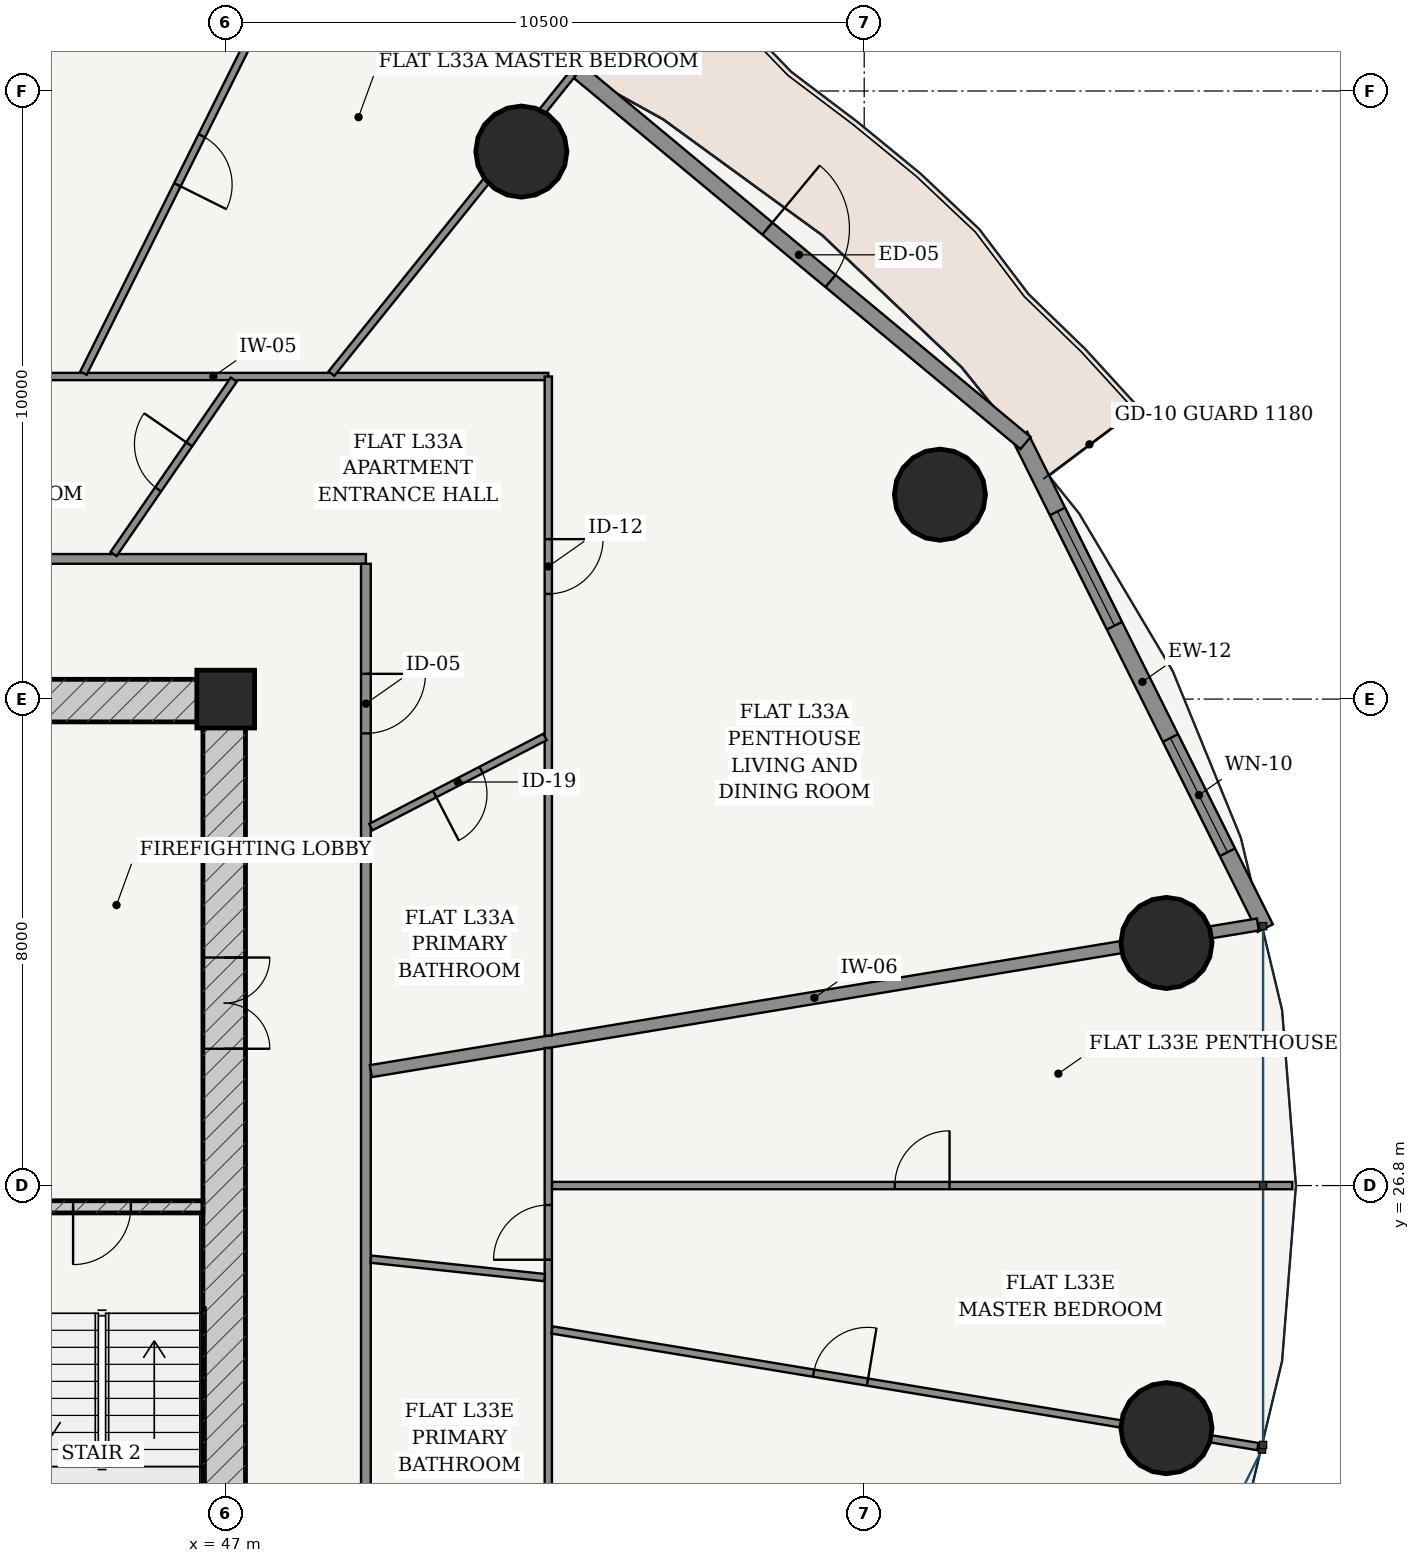
"""IFC4 building model, lengths in metres.
Left out: names, types, materials, properties, quantities, classifications, styles, units other than length and angle.
Written with IfcOpenShell. Run it as: python <this file> out.ifc"""

import sys

from ifc_helpers import new_model, si_unit, direction, frame, frame_2d, origin, origin_2d, place, context, subcontext, project, spatial, rectangle, hollow_circle, extrude, source, transform, mapped, element, fill, save


model = new_model("IFC4")
c1 = context("Model", 3, precision=1e-05, world=origin(), true_north=direction((-0.2419218956, 0.970295726276)))
c2 = subcontext(c1, "Body", "Model", "MODEL_VIEW")
j1 = project(units=[si_unit("LENGTHUNIT", "METRE"), si_unit("PLANEANGLEUNIT", "RADIAN")], contexts=[c1])
p1 = place(None, origin())
s1 = spatial("IfcSite", under=j1, at=p1, CompositionType="ELEMENT")
p2 = place(p1, origin())
s2 = spatial("IfcBuilding", under=s1, at=p2, CompositionType="ELEMENT")
p3 = place(p2, frame((0.0, 0.0, 126.6)))
s3 = spatial("IfcBuildingStorey", under=s2, at=p3, CompositionType="ELEMENT", Elevation=126.6)
p4 = place(p3, frame((47.0, 34.8, 0.0), z_axis=(0.0, 0.0, 1.0), x_axis=(1.0, 0.0, 0.0)))
e1 = element("IfcColumn", 1, at=p4, inside=s3, PredefinedType="COLUMN", context=c2, shape_type="SweptSolid", body=[
    extrude(rectangle(XDim=0.95, YDim=0.95, at=origin_2d()), origin(), (0.0, 0.0, 1.0), 3.6),
])
p5 = place(p3, frame((28.675, 34.775, 0.0), z_axis=(0.0, 0.0, 1.0), x_axis=(1.0, 0.0, 0.0)))
e2 = element("IfcWall", 2, at=p5, inside=s3, PredefinedType="SHEAR", context=c2, shape_type="SweptSolid", body=[
    extrude(rectangle(XDim=18.65, YDim=0.7, at=frame_2d((9.325, 0.0))), origin(), (0.0, 0.0, 1.0), 3.15),
])
p6 = place(p5, frame((8.9, 0.0, 0.0)))
e3 = element("IfcOpeningElement", 3, at=p6, cuts=e2, PredefinedType="OPENING", context=c2, shape_type="SweptSolid", body=[
    extrude(rectangle(XDim=0.85, YDim=2.1, at=frame_2d((0.425, 1.05))), frame((0.0, 0.36, 0.0), z_axis=(0.0, -1.0, 0.0), x_axis=(1.0, 0.0, 0.0)), (0.0, 0.0, 1.0), 0.72),
])
p7 = place(p3, frame((46.975, 19.175, 0.0), z_axis=(0.0, 0.0, 1.0), x_axis=(0.0, 1.0, 0.0)))
e4 = element("IfcWall", 4, at=p7, inside=s3, PredefinedType="SHEAR", context=c2, shape_type="SweptSolid", body=[
    extrude(rectangle(XDim=15.25, YDim=0.7, at=frame_2d((7.625, 0.0))), origin(), (0.0, 0.0, 1.0), 3.15),
])
p8 = place(p7, frame((9.875, 0.0, 0.0)))
e5 = element("IfcOpeningElement", 5, at=p8, cuts=e4, PredefinedType="OPENING", context=c2, shape_type="SweptSolid", body=[
    extrude(rectangle(XDim=1.5, YDim=2.2, at=frame_2d((0.75, 1.1))), frame((0.0, 0.36, 0.0), z_axis=(0.0, -1.0, 0.0), x_axis=(1.0, 0.0, 0.0)), (0.0, 0.0, 1.0), 0.72),
])
p9 = place(p3, frame((43.305, 26.45, 0.0), z_axis=(0.0, 0.0, 1.0), x_axis=(1.0, 0.0, 0.0)))
e6 = element("IfcWall", 6, at=p9, inside=s3, PredefinedType="SOLIDWALL", context=c2, shape_type="SweptSolid", body=[
    extrude(rectangle(XDim=3.32, YDim=0.2, at=frame_2d((1.66, 0.0))), origin(), (0.0, 0.0, 1.0), 3.15),
])
p10 = place(p9, frame((1.185, 0.0, 0.0)))
e7 = element("IfcOpeningElement", 7, at=p10, cuts=e6, PredefinedType="OPENING", context=c2, shape_type="SweptSolid", body=[
    extrude(rectangle(XDim=0.95, YDim=2.15, at=frame_2d((0.475, 1.075))), frame((0.0, 0.11, 0.0), z_axis=(0.0, -1.0, 0.0), x_axis=(1.0, 0.0, 0.0)), (0.0, 0.0, 1.0), 0.22),
])
for number, where, z_axis, x_axis in (
    (8, (62.471, 30.79, 0.0), (0.0, 0.0, 1.0), (1.0, 0.0, 0.0)),
    (9, (58.745, 38.161, 0.0), (0.0, 0.0, 1.0), (1.0, 0.0, 0.0)),
    (10, (51.862, 43.803, 0.0), (0.0, 0.0, 1.0), (1.0, 0.0, 0.0)),
    (11, (62.471, 22.81, 0.0), (0.0, 0.0, 1.0), (1.0, 0.0, 0.0)),
):
    element("IfcColumn", number, at=place(p3, frame(where, z_axis=z_axis, x_axis=x_axis)), inside=s3, PredefinedType="COLUMN", context=c2, shape_type="SweptSolid", body=[
        extrude(hollow_circle(Radius=0.75, WallThickness=0.045, at=origin_2d()), origin(), (0.0, 0.0, 1.0), 3.6),
    ])
p11 = place(p3, frame((64.095, 31.034, 0.0), z_axis=(0.0, 0.0, 1.0), x_axis=(-0.446263788661, 0.894901464369, 0.0)))
e12 = element("IfcWall", 12, at=p11, inside=s3, PredefinedType="SOLIDWALL", context=c2, shape_type="SweptSolid", body=[
    extrude(rectangle(XDim=9.05, YDim=0.28, at=frame_2d((4.525, 0.0))), origin(), (0.0, 0.0, 1.0), 3.15),
])
p12 = place(p11, frame((1.394, 0.0, 0.85)))
e13 = element("IfcOpeningElement", 13, at=p12, cuts=e12, PredefinedType="OPENING", context=c2, shape_type="SweptSolid", body=[
    extrude(rectangle(XDim=2.1, YDim=1.95, at=frame_2d((1.05, 0.975))), frame((0.0, 0.15, 0.0), z_axis=(0.0, -1.0, 0.0), x_axis=(1.0, 0.0, 0.0)), (0.0, 0.0, 1.0), 0.3),
])
p13 = place(p11, frame((5.557, 0.0, 0.85)))
e14 = element("IfcOpeningElement", 14, at=p13, cuts=e12, PredefinedType="OPENING", context=c2, shape_type="SweptSolid", body=[
    extrude(rectangle(XDim=2.1, YDim=1.95, at=frame_2d((1.05, 0.975))), frame((0.0, 0.15, 0.0), z_axis=(0.0, -1.0, 0.0), x_axis=(1.0, 0.0, 0.0)), (0.0, 0.0, 1.0), 0.3),
])
p14 = place(p3, frame((60.154, 39.01, 0.0), z_axis=(0.0, 0.0, 1.0), x_axis=(-0.769242574941, 0.638956853706, 0.0)))
e15 = element("IfcWall", 15, at=p14, inside=s3, PredefinedType="SOLIDWALL", context=c2, shape_type="SweptSolid", body=[
    extrude(rectangle(XDim=9.69, YDim=0.26, at=frame_2d((4.845, 0.0))), origin(), (0.0, 0.0, 1.0), 3.15),
])
p15 = place(p14, frame((4.17, 0.0, 0.0)))
e16 = element("IfcOpeningElement", 16, at=p15, cuts=e15, PredefinedType="OPENING", context=c2, shape_type="SweptSolid", body=[
    extrude(rectangle(XDim=1.35, YDim=2.2, at=frame_2d((0.675, 1.1))), frame((0.0, 0.14, 0.0), z_axis=(0.0, -1.0, 0.0), x_axis=(1.0, 0.0, 0.0)), (0.0, 0.0, 1.0), 0.28),
])
p16 = place(p3, frame((26.695, 37.105, 0.0), z_axis=(0.0, 0.0, 1.0), x_axis=(1.0, 0.0, 0.0)))
e17 = element("IfcWall", 17, at=p16, inside=s3, PredefinedType="PARTITIONING", context=c2, shape_type="SweptSolid", body=[
    extrude(rectangle(XDim=22.61, YDim=0.16, at=frame_2d((11.305, 0.0))), origin(), (0.0, 0.0, 1.0), 2.596),
])
p17 = place(p16, frame((4.925, 0.0, 0.0)))
e18 = element("IfcOpeningElement", 18, at=p17, cuts=e17, PredefinedType="OPENING", context=c2, shape_type="SweptSolid", body=[
    extrude(rectangle(XDim=0.98, YDim=2.2, at=frame_2d((0.49, 1.1))), frame((0.0, 0.09, 0.0), z_axis=(0.0, -1.0, 0.0), x_axis=(1.0, 0.0, 0.0)), (0.0, 0.0, 1.0), 0.18),
])
p18 = place(p3, frame((49.305, 16.575, 0.0), z_axis=(0.0, 0.0, 1.0), x_axis=(0.0, 1.0, 0.0)))
e19 = element("IfcWall", 19, at=p18, inside=s3, PredefinedType="PARTITIONING", context=c2, shape_type="SweptSolid", body=[
    extrude(rectangle(XDim=20.45, YDim=0.16, at=frame_2d((10.225, 0.0))), origin(), (0.0, 0.0, 1.0), 2.596),
])
p19 = place(p18, frame((17.66, 0.0, 0.0)))
e20 = element("IfcOpeningElement", 20, at=p19, cuts=e19, PredefinedType="OPENING", context=c2, shape_type="SweptSolid", body=[
    extrude(rectangle(XDim=0.98, YDim=2.2, at=frame_2d((0.49, 1.1))), frame((0.0, 0.09, 0.0), z_axis=(0.0, -1.0, 0.0), x_axis=(1.0, 0.0, 0.0)), (0.0, 0.0, 1.0), 0.18),
])
p20 = place(p18, frame((1.374, 0.0, 0.0)))
e21 = element("IfcOpeningElement", 21, at=p20, cuts=e19, PredefinedType="OPENING", context=c2, shape_type="SweptSolid", body=[
    extrude(rectangle(XDim=0.98, YDim=2.2, at=frame_2d((0.49, 1.1))), frame((0.0, 0.09, 0.0), z_axis=(0.0, -1.0, 0.0), x_axis=(1.0, 0.0, 0.0)), (0.0, 0.0, 1.0), 0.18),
])
p21 = place(p3, frame((49.387, 28.682, 0.0), z_axis=(0.0, 0.0, 1.0), x_axis=(0.986617934215, 0.163049231479, 0.0)))
e22 = element("IfcWall", 22, at=p21, inside=s3, PredefinedType="PARTITIONING", context=c2, shape_type="SweptSolid", body=[
    extrude(rectangle(XDim=14.785, YDim=0.2, at=frame_2d((7.392, 0.0))), origin(), (0.0, 0.0, 1.0), 2.5),
])
p22 = place(p3, frame((41.287, 40.105, 0.0), z_axis=(0.0, 0.0, 1.0), x_axis=(1.0, 0.0, 0.0)))
e23 = element("IfcWall", 23, at=p22, inside=s3, PredefinedType="PARTITIONING", context=c2, shape_type="SweptSolid", body=[
    extrude(rectangle(XDim=11.018, YDim=0.12, at=frame_2d((5.509, 0.0))), origin(), (0.0, 0.0, 1.0), 2.596),
])
p23 = place(p22, frame((1.357, 0.0, 0.0)))
e24 = element("IfcOpeningElement", 24, at=p23, cuts=e23, PredefinedType="OPENING", context=c2, shape_type="SweptSolid", body=[
    extrude(rectangle(XDim=0.9, YDim=2.15, at=frame_2d((0.45, 1.075))), frame((0.0, 0.07, 0.0), z_axis=(0.0, -1.0, 0.0), x_axis=(1.0, 0.0, 0.0)), (0.0, 0.0, 1.0), 0.14),
])
p24 = place(p3, frame((52.305, 40.105, 0.0), z_axis=(0.0, 0.0, 1.0), x_axis=(0.0, -1.0, 0.0)))
e25 = element("IfcWall", 25, at=p24, inside=s3, PredefinedType="PARTITIONING", context=c2, shape_type="SweptSolid", body=[
    extrude(rectangle(XDim=10.839, YDim=0.12, at=frame_2d((5.419, 0.0))), origin(), (0.0, 0.0, 1.0), 2.596),
])
p25 = place(p24, frame((2.675, 0.0, 0.0)))
e26 = element("IfcOpeningElement", 26, at=p25, cuts=e25, PredefinedType="OPENING", context=c2, shape_type="SweptSolid", body=[
    extrude(rectangle(XDim=0.9, YDim=2.15, at=frame_2d((0.45, 1.075))), frame((0.0, 0.07, 0.0), z_axis=(0.0, -1.0, 0.0), x_axis=(1.0, 0.0, 0.0)), (0.0, 0.0, 1.0), 0.14),
])
p26 = place(p3, frame((48.739, 40.153, 0.0), z_axis=(0.0, 0.0, 1.0), x_axis=(0.626714875168, 0.779248654309, 0.0)))
e27 = element("IfcWall", 27, at=p26, inside=s3, PredefinedType="PARTITIONING", context=c2, shape_type="SweptSolid", body=[
    extrude(rectangle(XDim=6.332, YDim=0.12, at=frame_2d((3.166, 0.0))), origin(), (0.0, 0.0, 1.0), 2.5),
])
p27 = place(p3, frame((44.661, 40.16, 0.0), z_axis=(0.0, 0.0, 1.0), x_axis=(0.446177198157, 0.894944639542, 0.0)))
e28 = element("IfcWall", 28, at=p27, inside=s3, PredefinedType="PARTITIONING", context=c2, shape_type="SweptSolid", body=[
    extrude(rectangle(XDim=7.823, YDim=0.12, at=frame_2d((3.912, 0.0))), origin(), (0.0, 0.0, 1.0), 2.666),
])
p28 = place(p27, frame((3.461, 0.0, 0.0)))
e29 = element("IfcOpeningElement", 29, at=p28, cuts=e28, PredefinedType="OPENING", context=c2, shape_type="SweptSolid", body=[
    extrude(rectangle(XDim=0.9, YDim=2.15, at=frame_2d((0.45, 1.075))), frame((0.0, 0.07, 0.0), z_axis=(0.0, -1.0, 0.0), x_axis=(1.0, 0.0, 0.0)), (0.0, 0.0, 1.0), 0.14),
])
p29 = place(p3, frame((49.387, 32.695, 0.0), z_axis=(0.0, 0.0, 1.0), x_axis=(0.888069491277, 0.459709232737, 0.0)))
e30 = element("IfcWall", 30, at=p29, inside=s3, PredefinedType="PARTITIONING", context=c2, shape_type="SweptSolid", body=[
    extrude(rectangle(XDim=3.224, YDim=0.12, at=frame_2d((1.612, 0.0))), origin(), (0.0, 0.0, 1.0), 2.825),
])
p30 = place(p29, frame((1.182, 0.0, 0.0)))
e31 = element("IfcOpeningElement", 31, at=p30, cuts=e30, PredefinedType="OPENING", context=c2, shape_type="SweptSolid", body=[
    extrude(rectangle(XDim=0.86, YDim=2.15, at=frame_2d((0.43, 1.075))), frame((0.0, 0.07, 0.0), z_axis=(0.0, -1.0, 0.0), x_axis=(1.0, 0.0, 0.0)), (0.0, 0.0, 1.0), 0.14),
])
p31 = place(p3, frame((45.155, 37.185, 0.0), z_axis=(0.0, 0.0, 1.0), x_axis=(0.567393940912, 0.82344648631, 0.0)))
e32 = element("IfcWall", 32, at=p31, inside=s3, PredefinedType="PARTITIONING", context=c2, shape_type="SweptSolid", body=[
    extrude(rectangle(XDim=3.484, YDim=0.12, at=frame_2d((1.742, 0.0))), origin(), (0.0, 0.0, 1.0), 2.825),
])
p32 = place(p31, frame((1.292, 0.0, 0.0)))
e33 = element("IfcOpeningElement", 33, at=p32, cuts=e32, PredefinedType="OPENING", context=c2, shape_type="SweptSolid", body=[
    extrude(rectangle(XDim=0.9, YDim=2.15, at=frame_2d((0.45, 1.075))), frame((0.0, 0.07, 0.0), z_axis=(0.0, -1.0, 0.0), x_axis=(1.0, 0.0, 0.0)), (0.0, 0.0, 1.0), 0.14),
])
p33 = place(p3, frame((52.305, 29.062, 0.0), z_axis=(0.0, 0.0, 1.0), x_axis=(0.0, -1.0, 0.0)))
e34 = element("IfcWall", 34, at=p33, inside=s3, PredefinedType="PARTITIONING", context=c2, shape_type="SweptSolid", body=[
    extrude(rectangle(XDim=15.567, YDim=0.12, at=frame_2d((7.783, 0.0))), origin(), (0.0, 0.0, 1.0), 2.596),
])
p34 = place(p33, frame((12.535, 0.0, 0.0)))
e35 = element("IfcOpeningElement", 35, at=p34, cuts=e34, PredefinedType="OPENING", context=c2, shape_type="SweptSolid", body=[
    extrude(rectangle(XDim=0.9, YDim=2.15, at=frame_2d((0.45, 1.075))), frame((0.0, 0.07, 0.0), z_axis=(0.0, -1.0, 0.0), x_axis=(1.0, 0.0, 0.0)), (0.0, 0.0, 1.0), 0.14),
])
p35 = place(p33, frame((2.582, 0.0, 0.0)))
e36 = element("IfcOpeningElement", 36, at=p35, cuts=e34, PredefinedType="OPENING", context=c2, shape_type="SweptSolid", body=[
    extrude(rectangle(XDim=0.9, YDim=2.15, at=frame_2d((0.45, 1.075))), frame((0.0, 0.07, 0.0), z_axis=(0.0, -1.0, 0.0), x_axis=(1.0, 0.0, 0.0)), (0.0, 0.0, 1.0), 0.14),
])
p36 = place(p3, frame((52.366, 24.426, 0.0), z_axis=(0.0, 0.0, 1.0), x_axis=(0.986619012175, -0.163042708564, 0.0)))
e37 = element("IfcWall", 37, at=p36, inside=s3, PredefinedType="PARTITIONING", context=c2, shape_type="SweptSolid", body=[
    extrude(rectangle(XDim=11.765, YDim=0.12, at=frame_2d((5.883, 0.0))), origin(), (0.0, 0.0, 1.0), 2.5),
])
p37 = place(p36, frame((4.359, 0.0, 0.0)))
e38 = element("IfcOpeningElement", 38, at=p37, cuts=e37, PredefinedType="OPENING", context=c2, shape_type="SweptSolid", body=[
    extrude(rectangle(XDim=0.9, YDim=2.15, at=frame_2d((0.45, 1.075))), frame((0.0, 0.07, 0.0), z_axis=(0.0, -1.0, 0.0), x_axis=(1.0, 0.0, 0.0)), (0.0, 0.0, 1.0), 0.14),
])
p38 = place(p3, frame((52.367, 26.8, 0.0), z_axis=(0.0, 0.0, 1.0), x_axis=(1.0, 0.0, 0.0)))
e39 = element("IfcWall", 39, at=p38, inside=s3, PredefinedType="PARTITIONING", context=c2, shape_type="SweptSolid", body=[
    extrude(rectangle(XDim=12.173, YDim=0.12, at=frame_2d((6.086, 0.0))), origin(), (0.0, 0.0, 1.0), 2.666),
])
p39 = place(p38, frame((5.636, 0.0, 0.0)))
e40 = element("IfcOpeningElement", 40, at=p39, cuts=e39, PredefinedType="OPENING", context=c2, shape_type="SweptSolid", body=[
    extrude(rectangle(XDim=0.9, YDim=2.15, at=frame_2d((0.45, 1.075))), frame((0.0, 0.07, 0.0), z_axis=(0.0, -1.0, 0.0), x_axis=(1.0, 0.0, 0.0)), (0.0, 0.0, 1.0), 0.14),
])
p40 = place(p3, frame((49.387, 25.59, 0.0), z_axis=(0.0, 0.0, 1.0), x_axis=(0.99440393079, -0.105644793673, 0.0)))
e41 = element("IfcWall", 41, at=p40, inside=s3, PredefinedType="PARTITIONING", context=c2, shape_type="SweptSolid", body=[
    extrude(rectangle(XDim=2.873, YDim=0.12, at=frame_2d((1.436, 0.0))), origin(), (0.0, 0.0, 1.0), 3.15),
])
m1 = source(origin(), c2, "Body", "SweptSolid", [
    extrude(rectangle(XDim=2.1, YDim=1.95, at=frame_2d((1.05, 0.975))), frame((0.0, 0.03, 0.0), z_axis=(0.0, -1.0, 0.0), x_axis=(1.0, 0.0, 0.0)), (0.0, 0.0, 1.0), 0.06),
])
p41 = place(p12, origin())
e42 = element("IfcWindow", 42, at=p41, inside=s3, PartitioningType="SINGLE_PANEL", PredefinedType="WINDOW", context=c2, shape_type="MappedRepresentation", body=[
    mapped(m1, transform((0.0, 0.0, 0.0), scale=1.0)),
])
fill(e13, e42)
p42 = place(p13, origin())
e43 = element("IfcWindow", 43, at=p42, inside=s3, PartitioningType="SINGLE_PANEL", PredefinedType="WINDOW", context=c2, shape_type="MappedRepresentation", body=[
    mapped(m1, transform((0.0, 0.0, 0.0), scale=1.0)),
])
fill(e14, e43)
m2 = source(origin(), c2, "Body", "SweptSolid", [
    extrude(rectangle(XDim=1.35, YDim=2.2, at=frame_2d((0.675, 1.1))), frame((0.0, 0.025, 0.0), z_axis=(0.0, -1.0, 0.0), x_axis=(1.0, 0.0, 0.0)), (0.0, 0.0, 1.0), 0.05),
])
p43 = place(p15, frame((1.35, 0.0, 0.0), z_axis=(0.0, 0.0, 1.0), x_axis=(-1.0, 0.0, 0.0)))
e44 = element("IfcDoor", 44, at=p43, inside=s3, OperationType="SINGLE_SWING_LEFT", PredefinedType="DOOR", context=c2, shape_type="MappedRepresentation", body=[
    mapped(m2, transform((0.0, 0.0, 0.0), scale=1.0)),
])
fill(e16, e44)
m3 = source(origin(), c2, "Body", "SweptSolid", [
    extrude(rectangle(XDim=1.5, YDim=2.2, at=frame_2d((0.75, 1.1))), frame((0.0, 0.025, 0.0), z_axis=(0.0, -1.0, 0.0), x_axis=(1.0, 0.0, 0.0)), (0.0, 0.0, 1.0), 0.05),
])
p44 = place(p8, frame((1.5, 0.0, 0.0), z_axis=(0.0, 0.0, 1.0), x_axis=(-1.0, 0.0, 0.0)))
e45 = element("IfcDoor", 45, at=p44, inside=s3, OperationType="DOUBLE_DOOR_SINGLE_SWING", PredefinedType="DOOR", context=c2, shape_type="MappedRepresentation", body=[
    mapped(m3, transform((0.0, 0.0, 0.0), scale=1.0)),
])
fill(e5, e45)
m4 = source(origin(), c2, "Body", "SweptSolid", [
    extrude(rectangle(XDim=0.95, YDim=2.15, at=frame_2d((0.475, 1.075))), frame((0.0, 0.025, 0.0), z_axis=(0.0, -1.0, 0.0), x_axis=(1.0, 0.0, 0.0)), (0.0, 0.0, 1.0), 0.05),
])
p45 = place(p10, frame((0.95, 0.0, 0.0), z_axis=(0.0, 0.0, 1.0), x_axis=(-1.0, 0.0, 0.0)))
e46 = element("IfcDoor", 46, at=p45, inside=s3, OperationType="SINGLE_SWING_RIGHT", PredefinedType="DOOR", context=c2, shape_type="MappedRepresentation", body=[
    mapped(m4, transform((0.0, 0.0, 0.0), scale=1.0)),
])
fill(e7, e46)
m5 = source(origin(), c2, "Body", "SweptSolid", [
    extrude(rectangle(XDim=0.98, YDim=2.2, at=frame_2d((0.49, 1.1))), frame((0.0, 0.025, 0.0), z_axis=(0.0, -1.0, 0.0), x_axis=(1.0, 0.0, 0.0)), (0.0, 0.0, 1.0), 0.05),
])
p46 = place(p19, frame((0.98, 0.0, 0.0), z_axis=(0.0, 0.0, 1.0), x_axis=(-1.0, 0.0, 0.0)))
e47 = element("IfcDoor", 47, at=p46, inside=s3, OperationType="SINGLE_SWING_LEFT", PredefinedType="DOOR", context=c2, shape_type="MappedRepresentation", body=[
    mapped(m5, transform((0.0, 0.0, 0.0), scale=1.0)),
])
fill(e20, e47)
m6 = source(origin(), c2, "Body", "SweptSolid", [
    extrude(rectangle(XDim=0.86, YDim=2.15, at=frame_2d((0.43, 1.075))), frame((0.0, 0.025, 0.0), z_axis=(0.0, -1.0, 0.0), x_axis=(1.0, 0.0, 0.0)), (0.0, 0.0, 1.0), 0.05),
])
p47 = place(p30, frame((0.86, 0.0, 0.0), z_axis=(0.0, 0.0, 1.0), x_axis=(-1.0, 0.0, 0.0)))
e48 = element("IfcDoor", 48, at=p47, inside=s3, OperationType="SINGLE_SWING_RIGHT", PredefinedType="DOOR", context=c2, shape_type="MappedRepresentation", body=[
    mapped(m6, transform((0.0, 0.0, 0.0), scale=1.0)),
])
fill(e31, e48)
m7 = source(origin(), c2, "Body", "SweptSolid", [
    extrude(rectangle(XDim=0.9, YDim=2.15, at=frame_2d((0.45, 1.075))), frame((0.0, 0.025, 0.0), z_axis=(0.0, -1.0, 0.0), x_axis=(1.0, 0.0, 0.0)), (0.0, 0.0, 1.0), 0.05),
])
p48 = place(p25, origin())
e49 = element("IfcDoor", 49, at=p48, inside=s3, OperationType="SINGLE_SWING_LEFT", PredefinedType="DOOR", context=c2, shape_type="MappedRepresentation", body=[
    mapped(m7, transform((0.0, 0.0, 0.0), scale=1.0)),
])
fill(e26, e49)
p49 = place(p32, origin())
e50 = element("IfcDoor", 50, at=p49, inside=s3, OperationType="SINGLE_SWING_RIGHT", PredefinedType="DOOR", context=c2, shape_type="MappedRepresentation", body=[
    mapped(m7, transform((0.0, 0.0, 0.0), scale=1.0)),
])
fill(e33, e50)
p50 = place(p28, frame((0.9, 0.0, 0.0), z_axis=(0.0, 0.0, 1.0), x_axis=(-1.0, 0.0, 0.0)))
e51 = element("IfcDoor", 51, at=p50, inside=s3, OperationType="SINGLE_SWING_RIGHT", PredefinedType="DOOR", context=c2, shape_type="MappedRepresentation", body=[
    mapped(m7, transform((0.0, 0.0, 0.0), scale=1.0)),
])
fill(e29, e51)
p51 = place(p37, origin())
e52 = element("IfcDoor", 52, at=p51, inside=s3, OperationType="SINGLE_SWING_RIGHT", PredefinedType="DOOR", context=c2, shape_type="MappedRepresentation", body=[
    mapped(m7, transform((0.0, 0.0, 0.0), scale=1.0)),
])
fill(e38, e52)
p52 = place(p35, frame((0.9, 0.0, 0.0), z_axis=(0.0, 0.0, 1.0), x_axis=(-1.0, 0.0, 0.0)))
e53 = element("IfcDoor", 53, at=p52, inside=s3, OperationType="SINGLE_SWING_LEFT", PredefinedType="DOOR", context=c2, shape_type="MappedRepresentation", body=[
    mapped(m7, transform((0.0, 0.0, 0.0), scale=1.0)),
])
fill(e36, e53)
p53 = place(p39, origin())
e54 = element("IfcDoor", 54, at=p53, inside=s3, OperationType="SINGLE_SWING_RIGHT", PredefinedType="DOOR", context=c2, shape_type="MappedRepresentation", body=[
    mapped(m7, transform((0.0, 0.0, 0.0), scale=1.0)),
])
fill(e40, e54)
save(model, sys.argv[1])
